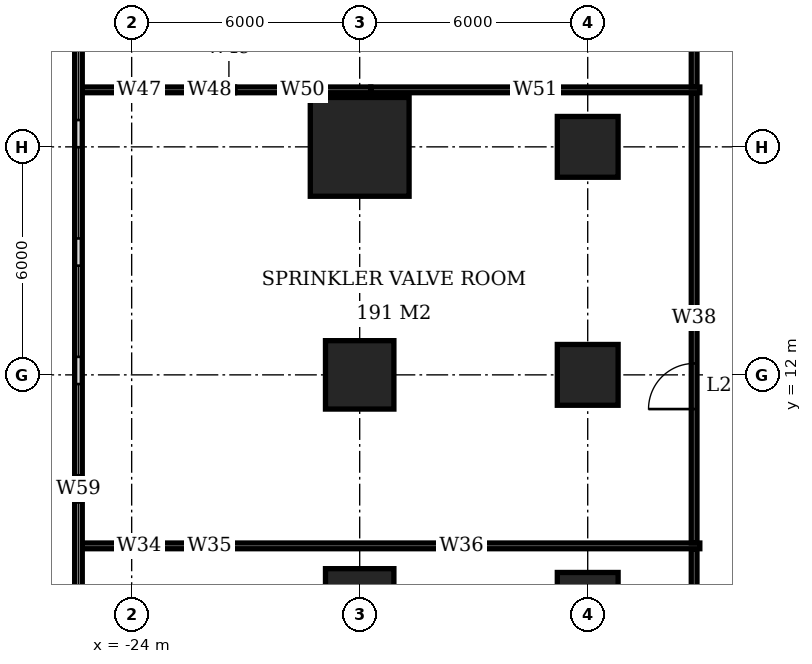
"""IFC4 building model, lengths in metres.
Left out: names, types, materials, properties, quantities, classifications, styles, units other than length and angle.
Written with IfcOpenShell. Run it as: python <this file> out.ifc"""

import sys

from ifc_helpers import new_model, si_unit, direction, frame, frame_2d, origin, origin_2d, place, context, subcontext, project, spatial, rectangle, extrude, element, fill, save


model = new_model("IFC4")
c1 = context("Model", 3, precision=1e-05, world=origin(), true_north=direction((0.0, 1.0)))
c2 = subcontext(c1, "Body", "Model", "MODEL_VIEW")
j1 = project(units=[si_unit("LENGTHUNIT", "METRE"), si_unit("PLANEANGLEUNIT", "RADIAN")], contexts=[c1])
p1 = place(None, origin())
s1 = spatial("IfcSite", under=j1, at=p1, CompositionType="ELEMENT")
p2 = place(p1, origin())
s2 = spatial("IfcBuilding", under=s1, at=p2, CompositionType="ELEMENT")
p3 = place(p2, frame((0.0, 0.0, 88.4)))
s3 = spatial("IfcBuildingStorey", under=s2, at=p3, CompositionType="ELEMENT", Elevation=88.4)
for number, where, z_axis, x_axis in (
    (1, (-18.0, 6.0, 0.0), (0.0, 0.0, 1.0), (1.0, 0.0, 0.0)),
    (2, (-18.0, 12.0, 0.0), (0.0, 0.0, 1.0), (1.0, 0.0, 0.0)),
):
    element("IfcColumn", number, at=place(p3, frame(where, z_axis=z_axis, x_axis=x_axis)), inside=s3, PredefinedType="COLUMN", context=c2, shape_type="SweptSolid", body=[
        extrude(rectangle(XDim=1.8, YDim=1.8, at=origin_2d()), origin(), (0.0, 0.0, 1.0), 5.4),
    ])
p4 = place(p3, frame((-18.0, 18.0, 0.0), z_axis=(0.0, 0.0, 1.0), x_axis=(1.0, 0.0, 0.0)))
e3 = element("IfcColumn", 3, at=p4, inside=s3, PredefinedType="COLUMN", context=c2, shape_type="SweptSolid", body=[
    extrude(rectangle(XDim=2.6, YDim=2.6, at=origin_2d()), origin(), (0.0, 0.0, 1.0), 5.4),
])
for number, where, z_axis, x_axis in (
    (4, (-12.0, 6.0, 0.0), (0.0, 0.0, 1.0), (1.0, 0.0, 0.0)),
    (5, (-12.0, 12.0, 0.0), (0.0, 0.0, 1.0), (1.0, 0.0, 0.0)),
    (6, (-12.0, 18.0, 0.0), (0.0, 0.0, 1.0), (1.0, 0.0, 0.0)),
):
    element("IfcColumn", number, at=place(p3, frame(where, z_axis=z_axis, x_axis=x_axis)), inside=s3, PredefinedType="COLUMN", context=c2, shape_type="SweptSolid", body=[
        extrude(rectangle(XDim=1.6, YDim=1.6, at=origin_2d()), origin(), (0.0, 0.0, 1.0), 5.4),
    ])
p5 = place(p3, frame((-25.4, 24.58, 0.0), z_axis=(0.0, 0.0, 1.0), x_axis=(0.0, -1.0, 0.0)))
e7 = element("IfcWall", 7, at=p5, inside=s3, PredefinedType="USERDEFINED", context=c2, shape_type="SweptSolid", body=[
    extrude(rectangle(XDim=31.16, YDim=0.2, at=frame_2d((15.58, 0.0))), origin(), (0.0, 0.0, 1.0), 5.4),
])
p6 = place(p5, frame((0.358, 0.0, 0.6)))
e8 = element("IfcOpeningElement", 8, at=p6, cuts=e7, PredefinedType="OPENING", context=c2, shape_type="SweptSolid", body=[
    extrude(rectangle(XDim=2.4, YDim=3.0, at=frame_2d((1.2, 1.5))), frame((0.0, 0.11, 0.0), z_axis=(0.0, -1.0, 0.0), x_axis=(1.0, 0.0, 0.0)), (0.0, 0.0, 1.0), 0.22),
])
p7 = place(p5, frame((3.474, 0.0, 0.6)))
e9 = element("IfcOpeningElement", 9, at=p7, cuts=e7, PredefinedType="OPENING", context=c2, shape_type="SweptSolid", body=[
    extrude(rectangle(XDim=2.4, YDim=3.0, at=frame_2d((1.2, 1.5))), frame((0.0, 0.11, 0.0), z_axis=(0.0, -1.0, 0.0), x_axis=(1.0, 0.0, 0.0)), (0.0, 0.0, 1.0), 0.22),
])
p8 = place(p5, frame((6.59, 0.0, 0.6)))
e10 = element("IfcOpeningElement", 10, at=p8, cuts=e7, PredefinedType="OPENING", context=c2, shape_type="SweptSolid", body=[
    extrude(rectangle(XDim=2.4, YDim=3.0, at=frame_2d((1.2, 1.5))), frame((0.0, 0.11, 0.0), z_axis=(0.0, -1.0, 0.0), x_axis=(1.0, 0.0, 0.0)), (0.0, 0.0, 1.0), 0.22),
])
p9 = place(p5, frame((9.706, 0.0, 0.6)))
e11 = element("IfcOpeningElement", 11, at=p9, cuts=e7, PredefinedType="OPENING", context=c2, shape_type="SweptSolid", body=[
    extrude(rectangle(XDim=2.4, YDim=3.0, at=frame_2d((1.2, 1.5))), frame((0.0, 0.11, 0.0), z_axis=(0.0, -1.0, 0.0), x_axis=(1.0, 0.0, 0.0)), (0.0, 0.0, 1.0), 0.22),
])
p10 = place(p5, frame((12.822, 0.0, 0.6)))
e12 = element("IfcOpeningElement", 12, at=p10, cuts=e7, PredefinedType="OPENING", context=c2, shape_type="SweptSolid", body=[
    extrude(rectangle(XDim=2.4, YDim=3.0, at=frame_2d((1.2, 1.5))), frame((0.0, 0.11, 0.0), z_axis=(0.0, -1.0, 0.0), x_axis=(1.0, 0.0, 0.0)), (0.0, 0.0, 1.0), 0.22),
])
p11 = place(p5, frame((15.938, 0.0, 0.6)))
e13 = element("IfcOpeningElement", 13, at=p11, cuts=e7, PredefinedType="OPENING", context=c2, shape_type="SweptSolid", body=[
    extrude(rectangle(XDim=2.4, YDim=3.0, at=frame_2d((1.2, 1.5))), frame((0.0, 0.11, 0.0), z_axis=(0.0, -1.0, 0.0), x_axis=(1.0, 0.0, 0.0)), (0.0, 0.0, 1.0), 0.22),
])
p12 = place(p5, frame((19.054, 0.0, 0.6)))
e14 = element("IfcOpeningElement", 14, at=p12, cuts=e7, PredefinedType="OPENING", context=c2, shape_type="SweptSolid", body=[
    extrude(rectangle(XDim=2.4, YDim=3.0, at=frame_2d((1.2, 1.5))), frame((0.0, 0.11, 0.0), z_axis=(0.0, -1.0, 0.0), x_axis=(1.0, 0.0, 0.0)), (0.0, 0.0, 1.0), 0.22),
])
p13 = place(p5, frame((22.17, 0.0, 0.6)))
e15 = element("IfcOpeningElement", 15, at=p13, cuts=e7, PredefinedType="OPENING", context=c2, shape_type="SweptSolid", body=[
    extrude(rectangle(XDim=2.4, YDim=3.0, at=frame_2d((1.2, 1.5))), frame((0.0, 0.11, 0.0), z_axis=(0.0, -1.0, 0.0), x_axis=(1.0, 0.0, 0.0)), (0.0, 0.0, 1.0), 0.22),
])
p14 = place(p5, frame((25.286, 0.0, 0.6)))
e16 = element("IfcOpeningElement", 16, at=p14, cuts=e7, PredefinedType="OPENING", context=c2, shape_type="SweptSolid", body=[
    extrude(rectangle(XDim=2.4, YDim=3.0, at=frame_2d((1.2, 1.5))), frame((0.0, 0.11, 0.0), z_axis=(0.0, -1.0, 0.0), x_axis=(1.0, 0.0, 0.0)), (0.0, 0.0, 1.0), 0.22),
])
p15 = place(p5, frame((28.402, 0.0, 0.6)))
e17 = element("IfcOpeningElement", 17, at=p15, cuts=e7, PredefinedType="OPENING", context=c2, shape_type="SweptSolid", body=[
    extrude(rectangle(XDim=2.4, YDim=3.0, at=frame_2d((1.2, 1.5))), frame((0.0, 0.11, 0.0), z_axis=(0.0, -1.0, 0.0), x_axis=(1.0, 0.0, 0.0)), (0.0, 0.0, 1.0), 0.22),
])
p16 = place(p3, frame((-25.3, 7.5, 0.0), z_axis=(0.0, 0.0, 1.0), x_axis=(1.0, 0.0, 0.0)))
e18 = element("IfcWall", 18, at=p16, inside=s3, PredefinedType="PARTITIONING", context=c2, shape_type="SweptSolid", body=[
    extrude(rectangle(XDim=2.99, YDim=0.15, at=frame_2d((1.495, 0.0))), origin(), (0.0, 0.0, 1.0), 5.15),
])
p17 = place(p3, frame((-22.31, 7.5, 0.0), z_axis=(0.0, 0.0, 1.0), x_axis=(1.0, 0.0, 0.0)))
e19 = element("IfcWall", 19, at=p17, inside=s3, PredefinedType="PARTITIONING", context=c2, shape_type="SweptSolid", body=[
    extrude(rectangle(XDim=0.72, YDim=0.15, at=frame_2d((0.36, 0.0))), origin(), (0.0, 0.0, 1.0), 4.15),
])
p18 = place(p3, frame((-21.59, 7.5, 0.0), z_axis=(0.0, 0.0, 1.0), x_axis=(1.0, 0.0, 0.0)))
e20 = element("IfcWall", 20, at=p18, inside=s3, PredefinedType="PARTITIONING", context=c2, shape_type="SweptSolid", body=[
    extrude(rectangle(XDim=12.54, YDim=0.15, at=frame_2d((6.27, 0.0))), origin(), (0.0, 0.0, 1.0), 5.15),
])
p19 = place(p3, frame((-25.3, 19.5, 0.0), z_axis=(0.0, 0.0, 1.0), x_axis=(1.0, 0.0, 0.0)))
e21 = element("IfcWall", 21, at=p19, inside=s3, PredefinedType="PARTITIONING", context=c2, shape_type="SweptSolid", body=[
    extrude(rectangle(XDim=2.99, YDim=0.15, at=frame_2d((1.495, 0.0))), origin(), (0.0, 0.0, 1.0), 5.15),
])
p20 = place(p3, frame((-22.31, 19.5, 0.0), z_axis=(0.0, 0.0, 1.0), x_axis=(1.0, 0.0, 0.0)))
e22 = element("IfcWall", 22, at=p20, inside=s3, PredefinedType="PARTITIONING", context=c2, shape_type="SweptSolid", body=[
    extrude(rectangle(XDim=0.72, YDim=0.15, at=frame_2d((0.36, 0.0))), origin(), (0.0, 0.0, 1.0), 4.15),
])
p21 = place(p3, frame((-21.59, 19.5, 0.0), z_axis=(0.0, 0.0, 1.0), x_axis=(1.0, 0.0, 0.0)))
e23 = element("IfcWall", 23, at=p21, inside=s3, PredefinedType="PARTITIONING", context=c2, shape_type="SweptSolid", body=[
    extrude(rectangle(XDim=0.298, YDim=0.15, at=frame_2d((0.149, 0.0))), origin(), (0.0, 0.0, 1.0), 5.15),
])
p22 = place(p3, frame((-21.292, 19.5, 0.0), z_axis=(0.0, 0.0, 1.0), x_axis=(1.0, 0.0, 0.0)))
e24 = element("IfcWall", 24, at=p22, inside=s3, PredefinedType="PARTITIONING", context=c2, shape_type="SweptSolid", body=[
    extrude(rectangle(XDim=3.584, YDim=0.15, at=frame_2d((1.792, 0.0))), origin(), (0.0, 0.0, 1.0), 4.15),
])
p23 = place(p3, frame((-17.708, 19.5, 0.0), z_axis=(0.0, 0.0, 1.0), x_axis=(1.0, 0.0, 0.0)))
e25 = element("IfcWall", 25, at=p23, inside=s3, PredefinedType="PARTITIONING", context=c2, shape_type="SweptSolid", body=[
    extrude(rectangle(XDim=8.658, YDim=0.15, at=frame_2d((4.329, 0.0))), origin(), (0.0, 0.0, 1.0), 5.15),
])
p24 = place(p3, frame((-9.2, -13.3, 0.0), z_axis=(0.0, 0.0, 1.0), x_axis=(0.0, 1.0, 0.0)))
e26 = element("IfcWall", 26, at=p24, inside=s3, PredefinedType="PARTITIONING", context=c2, shape_type="SweptSolid", body=[
    extrude(rectangle(XDim=20.725, YDim=0.15, at=frame_2d((10.363, 0.0))), origin(), (0.0, 0.0, 1.0), 5.15),
])
p25 = place(p24, frame((6.81, 0.0, 0.0)))
e27 = element("IfcOpeningElement", 27, at=p25, cuts=e26, PredefinedType="OPENING", context=c2, shape_type="SweptSolid", body=[
    extrude(rectangle(XDim=1.2, YDim=2.4, at=frame_2d((0.6, 1.2))), frame((0.0, 0.085, 0.0), z_axis=(0.0, -1.0, 0.0), x_axis=(1.0, 0.0, 0.0)), (0.0, 0.0, 1.0), 0.17),
])
p26 = place(p3, frame((-9.2, 7.575, 0.0), z_axis=(0.0, 0.0, 1.0), x_axis=(0.0, 1.0, 0.0)))
e28 = element("IfcWall", 28, at=p26, inside=s3, PredefinedType="PARTITIONING", context=c2, shape_type="SweptSolid", body=[
    extrude(rectangle(XDim=11.85, YDim=0.15, at=frame_2d((5.925, 0.0))), origin(), (0.0, 0.0, 1.0), 5.15),
])
p27 = place(p26, frame((3.525, 0.0, 0.0)))
e29 = element("IfcOpeningElement", 29, at=p27, cuts=e28, PredefinedType="OPENING", context=c2, shape_type="SweptSolid", body=[
    extrude(rectangle(XDim=1.2, YDim=2.4, at=frame_2d((0.6, 1.2))), frame((0.0, 0.085, 0.0), z_axis=(0.0, -1.0, 0.0), x_axis=(1.0, 0.0, 0.0)), (0.0, 0.0, 1.0), 0.17),
])
p28 = place(p3, frame((-9.2, 19.575, 0.0), z_axis=(0.0, 0.0, 1.0), x_axis=(0.0, 1.0, 0.0)))
e30 = element("IfcWall", 30, at=p28, inside=s3, PredefinedType="PARTITIONING", context=c2, shape_type="SweptSolid", body=[
    extrude(rectangle(XDim=8.015, YDim=0.15, at=frame_2d((4.008, 0.0))), origin(), (0.0, 0.0, 1.0), 5.15),
])
p29 = place(p28, frame((3.385, 0.0, 0.0)))
e31 = element("IfcOpeningElement", 31, at=p29, cuts=e30, PredefinedType="OPENING", context=c2, shape_type="SweptSolid", body=[
    extrude(rectangle(XDim=1.2, YDim=2.4, at=frame_2d((0.6, 1.2))), frame((0.0, 0.085, 0.0), z_axis=(0.0, -1.0, 0.0), x_axis=(1.0, 0.0, 0.0)), (0.0, 0.0, 1.0), 0.17),
])
p30 = place(p7, origin())
e32 = element("IfcWindow", 32, at=p30, inside=s3, PartitioningType="SINGLE_PANEL", PredefinedType="USERDEFINED", context=c2, shape_type="SweptSolid", body=[
    extrude(rectangle(XDim=2.4, YDim=3.0, at=frame_2d((1.2, 1.5))), frame((0.0, 0.03, 0.0), z_axis=(0.0, -1.0, 0.0), x_axis=(1.0, 0.0, 0.0)), (0.0, 0.0, 1.0), 0.06),
])
fill(e9, e32)
p31 = place(p8, origin())
e33 = element("IfcWindow", 33, at=p31, inside=s3, PartitioningType="SINGLE_PANEL", PredefinedType="USERDEFINED", context=c2, shape_type="SweptSolid", body=[
    extrude(rectangle(XDim=2.4, YDim=3.0, at=frame_2d((1.2, 1.5))), frame((0.0, 0.03, 0.0), z_axis=(0.0, -1.0, 0.0), x_axis=(1.0, 0.0, 0.0)), (0.0, 0.0, 1.0), 0.06),
])
fill(e10, e33)
p32 = place(p9, origin())
e34 = element("IfcWindow", 34, at=p32, inside=s3, PartitioningType="SINGLE_PANEL", PredefinedType="USERDEFINED", context=c2, shape_type="SweptSolid", body=[
    extrude(rectangle(XDim=2.4, YDim=3.0, at=frame_2d((1.2, 1.5))), frame((0.0, 0.03, 0.0), z_axis=(0.0, -1.0, 0.0), x_axis=(1.0, 0.0, 0.0)), (0.0, 0.0, 1.0), 0.06),
])
fill(e11, e34)
p33 = place(p10, origin())
e35 = element("IfcWindow", 35, at=p33, inside=s3, PartitioningType="SINGLE_PANEL", PredefinedType="USERDEFINED", context=c2, shape_type="SweptSolid", body=[
    extrude(rectangle(XDim=2.4, YDim=3.0, at=frame_2d((1.2, 1.5))), frame((0.0, 0.03, 0.0), z_axis=(0.0, -1.0, 0.0), x_axis=(1.0, 0.0, 0.0)), (0.0, 0.0, 1.0), 0.06),
])
fill(e12, e35)
p34 = place(p11, origin())
e36 = element("IfcWindow", 36, at=p34, inside=s3, PartitioningType="SINGLE_PANEL", PredefinedType="USERDEFINED", context=c2, shape_type="SweptSolid", body=[
    extrude(rectangle(XDim=2.4, YDim=3.0, at=frame_2d((1.2, 1.5))), frame((0.0, 0.03, 0.0), z_axis=(0.0, -1.0, 0.0), x_axis=(1.0, 0.0, 0.0)), (0.0, 0.0, 1.0), 0.06),
])
fill(e13, e36)
p35 = place(p27, origin())
e37 = element("IfcDoor", 37, at=p35, inside=s3, OperationType="SINGLE_SWING_LEFT", PredefinedType="DOOR", context=c2, shape_type="SweptSolid", body=[
    extrude(rectangle(XDim=1.2, YDim=2.4, at=frame_2d((0.6, 1.2))), frame((0.0, 0.025, 0.0), z_axis=(0.0, -1.0, 0.0), x_axis=(1.0, 0.0, 0.0)), (0.0, 0.0, 1.0), 0.05),
])
fill(e29, e37)
save(model, sys.argv[1])
